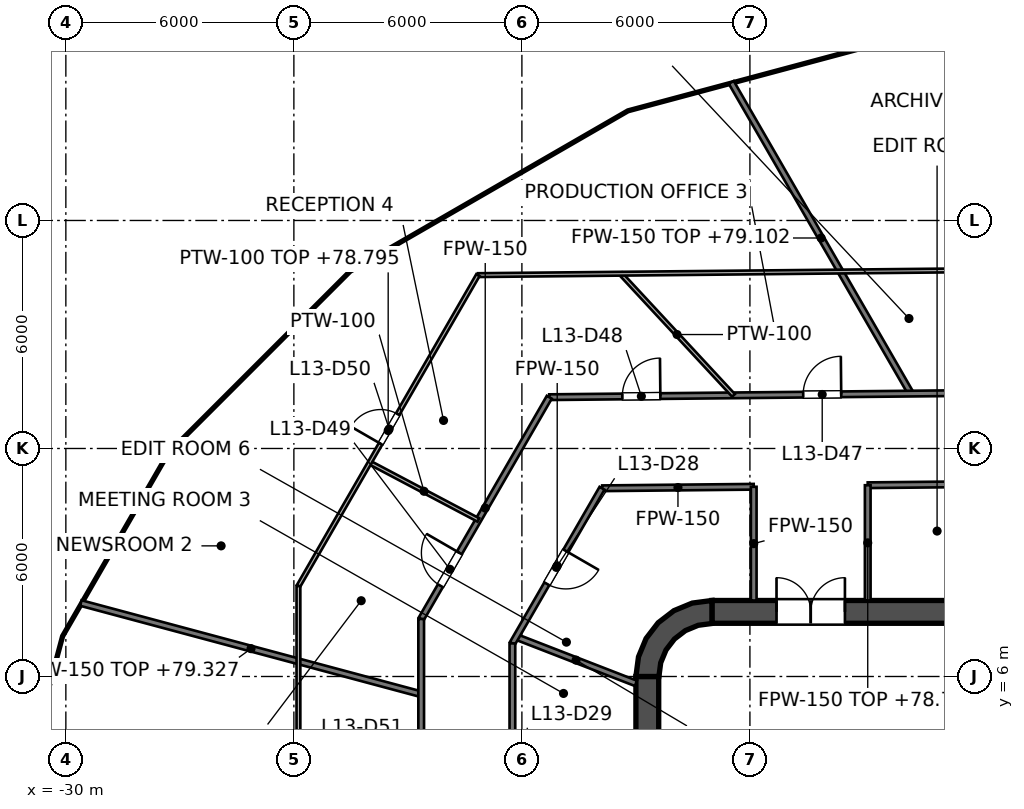
"""IFC4 building model, lengths in metres.
Left out: names, types, materials, properties, quantities, classifications, styles, units other than length and angle.
Written with IfcOpenShell. Run it as: python <this file> out.ifc"""

import sys

from ifc_helpers import new_model, si_unit, direction, frame, frame_2d, origin, place, context, subcontext, project, spatial, polyline, rectangle, outline, extrude, element, fill, save


model = new_model("IFC4")
c1 = context("Model", 3, precision=1e-05, world=origin(), true_north=direction((0.0, 1.0)))
c2 = subcontext(c1, "Body", "Model", "MODEL_VIEW")
j1 = project(units=[si_unit("LENGTHUNIT", "METRE"), si_unit("PLANEANGLEUNIT", "RADIAN")], contexts=[c1])
p1 = place(None, origin())
s1 = spatial("IfcSite", under=j1, at=p1, CompositionType="ELEMENT")
p2 = place(p1, origin())
s2 = spatial("IfcBuilding", under=s1, at=p2, CompositionType="ELEMENT")
p3 = place(p2, frame((0.0, 0.0, 75.6)))
s3 = spatial("IfcBuildingStorey", under=s2, at=p3, CompositionType="ELEMENT", Elevation=75.6)
p4 = place(p3, frame((-13.0, 7.7, 0.0), z_axis=(0.0, 0.0, 1.0), x_axis=(1.0, 0.0, 0.0)))
e1 = element("IfcWall", 1, at=p4, inside=s3, PredefinedType="SHEAR", context=c2, shape_type="SweptSolid", body=[
    extrude(rectangle(XDim=26.0, YDim=0.6, at=frame_2d((13.0, 0.0))), origin(), (0.0, 0.0, 1.0), 4.2),
])
p5 = place(p4, frame((1.7, 0.0, 0.0)))
e2 = element("IfcOpeningElement", 2, at=p5, cuts=e1, PredefinedType="OPENING", context=c2, shape_type="SweptSolid", body=[
    extrude(rectangle(XDim=1.8, YDim=2.1, at=frame_2d((0.9, 1.05))), frame((0.0, 0.3, 0.0), z_axis=(0.0, -1.0, 0.0), x_axis=(1.0, 0.0, 0.0)), (0.0, 0.0, 1.0), 0.6),
])
p6 = place(p4, frame((22.5, 0.0, 0.0)))
e3 = element("IfcOpeningElement", 3, at=p6, cuts=e1, PredefinedType="OPENING", context=c2, shape_type="SweptSolid", body=[
    extrude(rectangle(XDim=1.8, YDim=2.1, at=frame_2d((0.9, 1.05))), frame((0.0, 0.3, 0.0), z_axis=(0.0, -1.0, 0.0), x_axis=(1.0, 0.0, 0.0)), (0.0, 0.0, 1.0), 0.6),
])
p7 = place(p3, frame((-14.7, -6.0, 0.0), z_axis=(0.0, 0.0, 1.0), x_axis=(0.0, 1.0, 0.0)))
e4 = element("IfcWall", 4, at=p7, inside=s3, PredefinedType="SHEAR", context=c2, shape_type="SweptSolid", body=[
    extrude(rectangle(XDim=12.0, YDim=0.6, at=frame_2d((6.0, 0.0))), origin(), (0.0, 0.0, 1.0), 4.2),
])
p8 = place(p3, origin())
e5 = element("IfcWall", 5, at=p8, inside=s3, PredefinedType="SHEAR", context=c2, shape_type="SweptSolid", body=[
    extrude(outline(polyline([(-15.0, 6.0), (-14.395, 6.0), (-14.347, 6.361), (-14.208, 6.698), (-13.986, 6.986), (-13.698, 7.208), (-13.361, 7.347), (-13.0, 7.395), (-13.0, 8.0), (-13.518, 7.932), (-14.0, 7.732), (-14.414, 7.414), (-14.732, 7.0), (-14.932, 6.518), (-15.0, 6.0)])), origin(), (0.0, 0.0, 1.0), 4.2),
])
p9 = place(p3, frame((-9.0, 4.1, 0.0), z_axis=(0.0, 0.0, 1.0), x_axis=(0.0, 1.0, 0.0)))
e6 = element("IfcWall", 6, at=p9, inside=s3, PredefinedType="SOLIDWALL", context=c2, shape_type="SweptSolid", body=[
    extrude(rectangle(XDim=2.5, YDim=0.25, at=frame_2d((1.25, 0.0))), origin(), (0.0, 0.0, 1.0), 4.05),
])
p10 = place(p9, frame((0.65, 0.0, 0.0)))
e7 = element("IfcOpeningElement", 7, at=p10, cuts=e6, PredefinedType="OPENING", context=c2, shape_type="SweptSolid", body=[
    extrude(rectangle(XDim=1.2, YDim=2.1, at=frame_2d((0.6, 1.05))), frame((0.0, 0.125, 0.0), z_axis=(0.0, -1.0, 0.0), x_axis=(1.0, 0.0, 0.0)), (0.0, 0.0, 1.0), 0.25),
])
p11 = place(p3, frame((-9.125, 7.0, 0.0), z_axis=(0.0, 0.0, 1.0), x_axis=(1.0, 0.0, 0.0)))
e8 = element("IfcWall", 8, at=p11, inside=s3, PredefinedType="SOLIDWALL", context=c2, shape_type="SweptSolid", body=[
    extrude(rectangle(XDim=18.25, YDim=0.8, at=frame_2d((9.125, 0.0))), origin(), (0.0, 0.0, 1.0), 4.05),
])
p12 = place(p3, frame((-11.8, -7.4, 0.0), z_axis=(0.0, 0.0, 1.0), x_axis=(0.0, 1.0, 0.0)))
e9 = element("IfcWall", 9, at=p12, inside=s3, PredefinedType="SOLIDWALL", context=c2, shape_type="SweptSolid", body=[
    extrude(rectangle(XDim=14.8, YDim=0.4, at=frame_2d((7.4, 0.0))), origin(), (0.0, 0.0, 1.0), 4.05),
])
p13 = place(p12, frame((11.2, 0.0, 0.0)))
e10 = element("IfcOpeningElement", 10, at=p13, cuts=e9, PredefinedType="OPENING", context=c2, shape_type="SweptSolid", body=[
    extrude(rectangle(XDim=1.1, YDim=2.1, at=frame_2d((0.55, 1.05))), frame((0.0, 0.2, 0.0), z_axis=(0.0, -1.0, 0.0), x_axis=(1.0, 0.0, 0.0)), (0.0, 0.0, 1.0), 0.4),
])
p14 = place(p12, frame((8.3, 0.0, 0.0)))
e11 = element("IfcOpeningElement", 11, at=p14, cuts=e9, PredefinedType="OPENING", context=c2, shape_type="SweptSolid", body=[
    extrude(rectangle(XDim=1.1, YDim=2.1, at=frame_2d((0.55, 1.05))), frame((0.0, 0.2, 0.0), z_axis=(0.0, -1.0, 0.0), x_axis=(1.0, 0.0, 0.0)), (0.0, 0.0, 1.0), 0.4),
])
p15 = place(p12, frame((5.4, 0.0, 0.0)))
e12 = element("IfcOpeningElement", 12, at=p15, cuts=e9, PredefinedType="OPENING", context=c2, shape_type="SweptSolid", body=[
    extrude(rectangle(XDim=1.1, YDim=2.1, at=frame_2d((0.55, 1.05))), frame((0.0, 0.2, 0.0), z_axis=(0.0, -1.0, 0.0), x_axis=(1.0, 0.0, 0.0)), (0.0, 0.0, 1.0), 0.4),
])
p16 = place(p12, frame((13.552, 0.0, 0.0)))
e13 = element("IfcOpeningElement", 13, at=p16, cuts=e9, PredefinedType="OPENING", context=c2, shape_type="SweptSolid", body=[
    extrude(rectangle(XDim=0.9, YDim=2.1, at=frame_2d((0.45, 1.05))), frame((0.0, 0.2, 0.0), z_axis=(0.0, -1.0, 0.0), x_axis=(1.0, 0.0, 0.0)), (0.0, 0.0, 1.0), 0.4),
])
p17 = place(p12, frame((0.347, 0.0, 0.0)))
e14 = element("IfcOpeningElement", 14, at=p17, cuts=e9, PredefinedType="OPENING", context=c2, shape_type="SweptSolid", body=[
    extrude(rectangle(XDim=0.9, YDim=2.1, at=frame_2d((0.45, 1.05))), frame((0.0, 0.2, 0.0), z_axis=(0.0, -1.0, 0.0), x_axis=(1.0, 0.0, 0.0)), (0.0, 0.0, 1.0), 0.4),
])
e15 = element("IfcWall", 15, at=p8, inside=s3, PredefinedType="SOLIDWALL", context=c2, shape_type="SweptSolid", body=[
    extrude(outline(polyline([(-12.0, -5.925), (-12.0, -5.675), (-14.15, -5.675), (-14.15, -3.025), (-12.0, -3.025), (-12.0, -2.775), (-14.15, -2.775), (-14.15, -0.125), (-12.0, -0.125), (-12.0, 0.125), (-14.15, 0.125), (-14.15, 2.775), (-12.0, 2.775), (-12.0, 3.025), (-14.15, 3.025), (-14.15, 5.675), (-12.0, 5.675), (-12.0, 5.925), (-14.15, 5.925), (-14.4, 5.925), (-14.4, 5.675), (-14.4, 3.025), (-14.4, 2.775), (-14.4, 0.125), (-14.4, -0.125), (-14.4, -2.775), (-14.4, -3.025), (-14.4, -5.675), (-14.4, -5.925), (-14.15, -5.925), (-12.0, -5.925)])), origin(), (0.0, 0.0, 1.0), 4.05),
])
p18 = place(p3, frame((-12.491, 21.634, 0.0), z_axis=(0.0, 0.0, 1.0), x_axis=(0.500023386278, -0.86601190129, 0.0)))
e16 = element("IfcWall", 16, at=p18, inside=s3, PredefinedType="PARTITIONING", context=c2, shape_type="SweptSolid", body=[
    extrude(rectangle(XDim=9.457, YDim=0.15, at=frame_2d((4.729, 0.0))), origin(), (0.0, 0.0, 1.0), 3.502),
])
p19 = place(p3, frame((-18.151, 7.042, 0.0), z_axis=(0.0, 0.0, 1.0), x_axis=(0.93232154811, -0.361630378881, 0.0)))
e17 = element("IfcWall", 17, at=p19, inside=s3, PredefinedType="PARTITIONING", context=c2, shape_type="SweptSolid", body=[
    extrude(rectangle(XDim=3.38, YDim=0.15, at=frame_2d((1.69, 0.0))), origin(), (0.0, 0.0, 1.0), 4.05),
])
p20 = place(p3, frame((-29.605, 7.933, 0.0), z_axis=(0.0, 0.0, 1.0), x_axis=(0.965908551929, -0.258883505289, 0.0)))
e18 = element("IfcWall", 18, at=p20, inside=s3, PredefinedType="PARTITIONING", context=c2, shape_type="SweptSolid", body=[
    extrude(rectangle(XDim=9.271, YDim=0.15, at=frame_2d((4.636, 0.0))), origin(), (0.0, 0.0, 1.0), 3.727),
])
p21 = place(p3, frame((-15.887, 10.953, 0.0), z_axis=(0.0, 0.0, 1.0), x_axis=(0.999950802569, 0.009919296431, 0.0)))
e19 = element("IfcWall", 19, at=p21, inside=s3, PredefinedType="PARTITIONING", context=c2, shape_type="SweptSolid", body=[
    extrude(rectangle(XDim=3.987, YDim=0.15, at=frame_2d((1.994, 0.0))), origin(), (0.0, 0.0, 1.0), 3.195),
])
p22 = place(p3, frame((-8.9, 11.033, 0.0), z_axis=(0.0, 0.0, 1.0), x_axis=(0.999950834077, 0.009916119672, 0.0)))
e20 = element("IfcWall", 20, at=p22, inside=s3, PredefinedType="PARTITIONING", context=c2, shape_type="SweptSolid", body=[
    extrude(rectangle(XDim=17.801, YDim=0.15, at=frame_2d((8.9, 0.0))), origin(), (0.0, 0.0, 1.0), 3.127),
])
p23 = place(p22, frame((12.8, 0.0, 0.0)))
e21 = element("IfcOpeningElement", 21, at=p23, cuts=e20, PredefinedType="OPENING", context=c2, shape_type="SweptSolid", body=[
    extrude(rectangle(XDim=1.0, YDim=2.1, at=frame_2d((0.5, 1.05))), frame((0.0, 0.075, 0.0), z_axis=(0.0, -1.0, 0.0), x_axis=(1.0, 0.0, 0.0)), (0.0, 0.0, 1.0), 0.15),
])
p24 = place(p22, frame((3.901, 0.0, 0.0)))
e22 = element("IfcOpeningElement", 22, at=p24, cuts=e20, PredefinedType="OPENING", context=c2, shape_type="SweptSolid", body=[
    extrude(rectangle(XDim=1.0, YDim=2.1, at=frame_2d((0.5, 1.05))), frame((0.0, 0.075, 0.0), z_axis=(0.0, -1.0, 0.0), x_axis=(1.0, 0.0, 0.0)), (0.0, 0.0, 1.0), 0.15),
])
p25 = place(p3, frame((-17.281, 13.35, 0.0), z_axis=(0.0, 0.0, 1.0), x_axis=(0.999950941336, 0.009905297661, 0.0)))
e23 = element("IfcWall", 23, at=p25, inside=s3, PredefinedType="PARTITIONING", context=c2, shape_type="SweptSolid", body=[
    extrude(rectangle(XDim=31.771, YDim=0.15, at=frame_2d((15.885, 0.0))), origin(), (0.0, 0.0, 1.0), 3.127),
])
p26 = place(p25, frame((26.046, 0.0, 0.0)))
e24 = element("IfcOpeningElement", 24, at=p26, cuts=e23, PredefinedType="OPENING", context=c2, shape_type="SweptSolid", body=[
    extrude(rectangle(XDim=1.0, YDim=2.1, at=frame_2d((0.5, 1.05))), frame((0.0, 0.075, 0.0), z_axis=(0.0, -1.0, 0.0), x_axis=(1.0, 0.0, 0.0)), (0.0, 0.0, 1.0), 0.15),
])
p27 = place(p25, frame((22.203, 0.0, 0.0)))
e25 = element("IfcOpeningElement", 25, at=p27, cuts=e23, PredefinedType="OPENING", context=c2, shape_type="SweptSolid", body=[
    extrude(rectangle(XDim=1.0, YDim=2.1, at=frame_2d((0.5, 1.05))), frame((0.0, 0.075, 0.0), z_axis=(0.0, -1.0, 0.0), x_axis=(1.0, 0.0, 0.0)), (0.0, 0.0, 1.0), 0.15),
])
p28 = place(p25, frame((17.773, 0.0, 0.0)))
e26 = element("IfcOpeningElement", 26, at=p28, cuts=e23, PredefinedType="OPENING", context=c2, shape_type="SweptSolid", body=[
    extrude(rectangle(XDim=1.0, YDim=2.1, at=frame_2d((0.5, 1.05))), frame((0.0, 0.075, 0.0), z_axis=(0.0, -1.0, 0.0), x_axis=(1.0, 0.0, 0.0)), (0.0, 0.0, 1.0), 0.15),
])
p29 = place(p25, frame((12.445, 0.0, 0.0)))
e27 = element("IfcOpeningElement", 27, at=p29, cuts=e23, PredefinedType="OPENING", context=c2, shape_type="SweptSolid", body=[
    extrude(rectangle(XDim=1.0, YDim=2.1, at=frame_2d((0.5, 1.05))), frame((0.0, 0.075, 0.0), z_axis=(0.0, -1.0, 0.0), x_axis=(1.0, 0.0, 0.0)), (0.0, 0.0, 1.0), 0.15),
])
p30 = place(p25, frame((6.684, 0.0, 0.0)))
e28 = element("IfcOpeningElement", 28, at=p30, cuts=e23, PredefinedType="OPENING", context=c2, shape_type="SweptSolid", body=[
    extrude(rectangle(XDim=1.0, YDim=2.1, at=frame_2d((0.5, 1.05))), frame((0.0, 0.075, 0.0), z_axis=(0.0, -1.0, 0.0), x_axis=(1.0, 0.0, 0.0)), (0.0, 0.0, 1.0), 0.15),
])
p31 = place(p25, frame((1.925, 0.0, 0.0)))
e29 = element("IfcOpeningElement", 29, at=p31, cuts=e23, PredefinedType="OPENING", context=c2, shape_type="SweptSolid", body=[
    extrude(rectangle(XDim=1.0, YDim=2.1, at=frame_2d((0.5, 1.05))), frame((0.0, 0.075, 0.0), z_axis=(0.0, -1.0, 0.0), x_axis=(1.0, 0.0, 0.0)), (0.0, 0.0, 1.0), 0.15),
])
p32 = place(p3, frame((-18.25, 6.871, 0.0), z_axis=(0.0, 0.0, 1.0), x_axis=(0.500254304961, 0.865878530955, 0.0)))
e30 = element("IfcWall", 30, at=p32, inside=s3, PredefinedType="PARTITIONING", context=c2, shape_type="SweptSolid", body=[
    extrude(rectangle(XDim=4.715, YDim=0.15, at=frame_2d((2.357, 0.0))), origin(), (0.0, 0.0, 1.0), 3.195),
])
p33 = place(p32, frame((1.81, 0.0, 0.0)))
e31 = element("IfcOpeningElement", 31, at=p33, cuts=e30, PredefinedType="OPENING", context=c2, shape_type="SweptSolid", body=[
    extrude(rectangle(XDim=1.0, YDim=2.1, at=frame_2d((0.5, 1.05))), frame((0.0, 0.075, 0.0), z_axis=(0.0, -1.0, 0.0), x_axis=(1.0, 0.0, 0.0)), (0.0, 0.0, 1.0), 0.15),
])
p34 = place(p3, frame((-20.65, 7.514, 0.0), z_axis=(0.0, 0.0, 1.0), x_axis=(0.500199125334, 0.865910408192, 0.0)))
e32 = element("IfcWall", 32, at=p34, inside=s3, PredefinedType="PARTITIONING", context=c2, shape_type="SweptSolid", body=[
    extrude(rectangle(XDim=6.739, YDim=0.15, at=frame_2d((3.369, 0.0))), origin(), (0.0, 0.0, 1.0), 3.195),
])
p35 = place(p34, frame((1.01, 0.0, 0.0)))
e33 = element("IfcOpeningElement", 33, at=p35, cuts=e32, PredefinedType="OPENING", context=c2, shape_type="SweptSolid", body=[
    extrude(rectangle(XDim=1.0, YDim=2.1, at=frame_2d((0.5, 1.05))), frame((0.0, 0.075, 0.0), z_axis=(0.0, -1.0, 0.0), x_axis=(1.0, 0.0, 0.0)), (0.0, 0.0, 1.0), 0.15),
])
p36 = place(p3, frame((-8.9, 8.0, 0.0), z_axis=(0.0, 0.0, 1.0), x_axis=(0.0, 1.0, 0.0)))
e34 = element("IfcWall", 34, at=p36, inside=s3, PredefinedType="PARTITIONING", context=c2, shape_type="SweptSolid", body=[
    extrude(rectangle(XDim=3.033, YDim=0.15, at=frame_2d((1.517, 0.0))), origin(), (0.0, 0.0, 1.0), 3.127),
])
p37 = place(p3, frame((-11.9, 8.0, 0.0), z_axis=(0.0, 0.0, 1.0), x_axis=(0.0, 1.0, 0.0)))
e35 = element("IfcWall", 35, at=p37, inside=s3, PredefinedType="PARTITIONING", context=c2, shape_type="SweptSolid", body=[
    extrude(rectangle(XDim=2.992, YDim=0.15, at=frame_2d((1.496, 0.0))), origin(), (0.0, 0.0, 1.0), 3.195),
])
p38 = place(p3, frame((-18.25, -6.647, 0.0), z_axis=(0.0, 0.0, 1.0), x_axis=(0.0, 1.0, 0.0)))
e36 = element("IfcWall", 36, at=p38, inside=s3, PredefinedType="PARTITIONING", context=c2, shape_type="SweptSolid", body=[
    extrude(rectangle(XDim=13.518, YDim=0.15, at=frame_2d((6.759, 0.0))), origin(), (0.0, 0.0, 1.0), 3.118),
])
p39 = place(p38, frame((9.583, 0.0, 0.0)))
e37 = element("IfcOpeningElement", 37, at=p39, cuts=e36, PredefinedType="OPENING", context=c2, shape_type="SweptSolid", body=[
    extrude(rectangle(XDim=1.0, YDim=2.1, at=frame_2d((0.5, 1.05))), frame((0.0, 0.075, 0.0), z_axis=(0.0, -1.0, 0.0), x_axis=(1.0, 0.0, 0.0)), (0.0, 0.0, 1.0), 0.15),
])
p40 = place(p38, frame((2.823, 0.0, 0.0)))
e38 = element("IfcOpeningElement", 38, at=p40, cuts=e36, PredefinedType="OPENING", context=c2, shape_type="SweptSolid", body=[
    extrude(rectangle(XDim=1.0, YDim=2.1, at=frame_2d((0.5, 1.05))), frame((0.0, 0.075, 0.0), z_axis=(0.0, -1.0, 0.0), x_axis=(1.0, 0.0, 0.0)), (0.0, 0.0, 1.0), 0.15),
])
p41 = place(p3, frame((-20.65, -7.124, 0.0), z_axis=(0.0, 0.0, 1.0), x_axis=(0.0, 1.0, 0.0)))
e39 = element("IfcWall", 39, at=p41, inside=s3, PredefinedType="PARTITIONING", context=c2, shape_type="SweptSolid", body=[
    extrude(rectangle(XDim=14.638, YDim=0.15, at=frame_2d((7.319, 0.0))), origin(), (0.0, 0.0, 1.0), 3.118),
])
p42 = place(p41, frame((9.726, 0.0, 0.0)))
e40 = element("IfcOpeningElement", 40, at=p42, cuts=e39, PredefinedType="OPENING", context=c2, shape_type="SweptSolid", body=[
    extrude(rectangle(XDim=1.0, YDim=2.1, at=frame_2d((0.5, 1.05))), frame((0.0, 0.075, 0.0), z_axis=(0.0, -1.0, 0.0), x_axis=(1.0, 0.0, 0.0)), (0.0, 0.0, 1.0), 0.15),
])
p43 = place(p41, frame((5.057, 0.0, 0.0)))
e41 = element("IfcOpeningElement", 41, at=p43, cuts=e39, PredefinedType="OPENING", context=c2, shape_type="SweptSolid", body=[
    extrude(rectangle(XDim=1.0, YDim=2.1, at=frame_2d((0.5, 1.05))), frame((0.0, 0.075, 0.0), z_axis=(0.0, -1.0, 0.0), x_axis=(1.0, 0.0, 0.0)), (0.0, 0.0, 1.0), 0.15),
])
p44 = place(p3, frame((-15.402, 16.599, 0.0), z_axis=(0.0, 0.0, 1.0), x_axis=(0.68016798927, -0.733056277766, 0.0)))
e42 = element("IfcWall", 42, at=p44, inside=s3, PredefinedType="PARTITIONING", context=c2, shape_type="SweptSolid", body=[
    extrude(rectangle(XDim=4.367, YDim=0.1, at=frame_2d((2.184, 0.0))), origin(), (0.0, 0.0, 1.0), 4.05),
])
p45 = place(p3, frame((-22.004, 11.629, 0.0), z_axis=(0.0, 0.0, 1.0), x_axis=(0.884171604481, -0.467162256426, 0.0)))
e43 = element("IfcWall", 43, at=p45, inside=s3, PredefinedType="PARTITIONING", context=c2, shape_type="SweptSolid", body=[
    extrude(rectangle(XDim=3.232, YDim=0.1, at=frame_2d((1.616, 0.0))), origin(), (0.0, 0.0, 1.0), 4.05),
])
p46 = place(p3, frame((-19.157, 16.562, 0.0), z_axis=(0.0, 0.0, 1.0), x_axis=(0.99995144091, 0.009854735998, 0.0)))
e44 = element("IfcWall", 44, at=p46, inside=s3, PredefinedType="PARTITIONING", context=c2, shape_type="SweptSolid", body=[
    extrude(rectangle(XDim=28.886, YDim=0.1, at=frame_2d((14.443, 0.0))), origin(), (0.0, 0.0, 1.0), 3.127),
])
p47 = place(p46, frame((12.773, 0.0, 0.0)))
e45 = element("IfcOpeningElement", 45, at=p47, cuts=e44, PredefinedType="OPENING", context=c2, shape_type="SweptSolid", body=[
    extrude(rectangle(XDim=1.8, YDim=2.1, at=frame_2d((0.9, 1.05))), frame((0.0, 0.05, 0.0), z_axis=(0.0, -1.0, 0.0), x_axis=(1.0, 0.0, 0.0)), (0.0, 0.0, 1.0), 0.1),
])
p48 = place(p3, frame((-23.88, 8.379, 0.0), z_axis=(0.0, 0.0, 1.0), x_axis=(0.499871577197, 0.86609953603, 0.0)))
e46 = element("IfcWall", 46, at=p48, inside=s3, PredefinedType="PARTITIONING", context=c2, shape_type="SweptSolid", body=[
    extrude(rectangle(XDim=9.448, YDim=0.1, at=frame_2d((4.724, 0.0))), origin(), (0.0, 0.0, 1.0), 3.195),
])
p49 = place(p48, frame((4.325, 0.0, 0.0)))
e47 = element("IfcOpeningElement", 47, at=p49, cuts=e46, PredefinedType="OPENING", context=c2, shape_type="SweptSolid", body=[
    extrude(rectangle(XDim=0.9, YDim=2.1, at=frame_2d((0.45, 1.05))), frame((0.0, 0.05, 0.0), z_axis=(0.0, -1.0, 0.0), x_axis=(1.0, 0.0, 0.0)), (0.0, 0.0, 1.0), 0.1),
])
p50 = place(p3, frame((-23.88, -7.767, 0.0), z_axis=(0.0, 0.0, 1.0), x_axis=(0.0, 1.0, 0.0)))
e48 = element("IfcWall", 48, at=p50, inside=s3, PredefinedType="PARTITIONING", context=c2, shape_type="SweptSolid", body=[
    extrude(rectangle(XDim=16.146, YDim=0.1, at=frame_2d((8.073, 0.0))), origin(), (0.0, 0.0, 1.0), 3.118),
])
p51 = place(p13, origin())
e49 = element("IfcDoor", 49, at=p51, inside=s3, OperationType="DOUBLE_DOOR_SLIDING", PredefinedType="DOOR", context=c2, shape_type="SweptSolid", body=[
    extrude(rectangle(XDim=1.1, YDim=2.1, at=frame_2d((0.55, 1.05))), frame((0.0, 0.025, 0.0), z_axis=(0.0, -1.0, 0.0), x_axis=(1.0, 0.0, 0.0)), (0.0, 0.0, 1.0), 0.05),
])
fill(e10, e49)
p52 = place(p10, origin())
e50 = element("IfcDoor", 50, at=p52, inside=s3, OperationType="SINGLE_SWING_RIGHT", PredefinedType="DOOR", context=c2, shape_type="SweptSolid", body=[
    extrude(rectangle(XDim=1.2, YDim=2.1, at=frame_2d((0.6, 1.05))), frame((0.0, 0.025, 0.0), z_axis=(0.0, -1.0, 0.0), x_axis=(1.0, 0.0, 0.0)), (0.0, 0.0, 1.0), 0.05),
])
fill(e7, e50)
p53 = place(p16, origin())
e51 = element("IfcDoor", 51, at=p53, inside=s3, OperationType="SINGLE_SWING_LEFT", PredefinedType="DOOR", context=c2, shape_type="SweptSolid", body=[
    extrude(rectangle(XDim=0.9, YDim=2.1, at=frame_2d((0.45, 1.05))), frame((0.0, 0.025, 0.0), z_axis=(0.0, -1.0, 0.0), x_axis=(1.0, 0.0, 0.0)), (0.0, 0.0, 1.0), 0.05),
])
fill(e13, e51)
p54 = place(p5, origin())
e52 = element("IfcDoor", 52, at=p54, inside=s3, OperationType="DOUBLE_DOOR_SINGLE_SWING", PredefinedType="DOOR", context=c2, shape_type="SweptSolid", body=[
    extrude(rectangle(XDim=1.8, YDim=2.1, at=frame_2d((0.9, 1.05))), frame((0.0, 0.025, 0.0), z_axis=(0.0, -1.0, 0.0), x_axis=(1.0, 0.0, 0.0)), (0.0, 0.0, 1.0), 0.05),
])
fill(e2, e52)
p55 = place(p33, origin())
e53 = element("IfcDoor", 53, at=p55, inside=s3, OperationType="SINGLE_SWING_RIGHT", PredefinedType="DOOR", context=c2, shape_type="SweptSolid", body=[
    extrude(rectangle(XDim=1.0, YDim=2.1, at=frame_2d((0.5, 1.05))), frame((0.0, 0.025, 0.0), z_axis=(0.0, -1.0, 0.0), x_axis=(1.0, 0.0, 0.0)), (0.0, 0.0, 1.0), 0.05),
])
fill(e31, e53)
p56 = place(p30, origin())
e54 = element("IfcDoor", 54, at=p56, inside=s3, OperationType="SINGLE_SWING_RIGHT", PredefinedType="DOOR", context=c2, shape_type="SweptSolid", body=[
    extrude(rectangle(XDim=1.0, YDim=2.1, at=frame_2d((0.5, 1.05))), frame((0.0, 0.025, 0.0), z_axis=(0.0, -1.0, 0.0), x_axis=(1.0, 0.0, 0.0)), (0.0, 0.0, 1.0), 0.05),
])
fill(e28, e54)
p57 = place(p31, origin())
e55 = element("IfcDoor", 55, at=p57, inside=s3, OperationType="SINGLE_SWING_RIGHT", PredefinedType="DOOR", context=c2, shape_type="SweptSolid", body=[
    extrude(rectangle(XDim=1.0, YDim=2.1, at=frame_2d((0.5, 1.05))), frame((0.0, 0.025, 0.0), z_axis=(0.0, -1.0, 0.0), x_axis=(1.0, 0.0, 0.0)), (0.0, 0.0, 1.0), 0.05),
])
fill(e29, e55)
p58 = place(p35, origin())
e56 = element("IfcDoor", 56, at=p58, inside=s3, OperationType="SINGLE_SWING_RIGHT", PredefinedType="DOOR", context=c2, shape_type="SweptSolid", body=[
    extrude(rectangle(XDim=1.0, YDim=2.1, at=frame_2d((0.5, 1.05))), frame((0.0, 0.025, 0.0), z_axis=(0.0, -1.0, 0.0), x_axis=(1.0, 0.0, 0.0)), (0.0, 0.0, 1.0), 0.05),
])
fill(e33, e56)
p59 = place(p49, origin())
e57 = element("IfcDoor", 57, at=p59, inside=s3, OperationType="SINGLE_SWING_LEFT", PredefinedType="DOOR", context=c2, shape_type="SweptSolid", body=[
    extrude(rectangle(XDim=0.9, YDim=2.1, at=frame_2d((0.45, 1.05))), frame((0.0, 0.025, 0.0), z_axis=(0.0, -1.0, 0.0), x_axis=(1.0, 0.0, 0.0)), (0.0, 0.0, 1.0), 0.05),
])
fill(e47, e57)
save(model, sys.argv[1])
